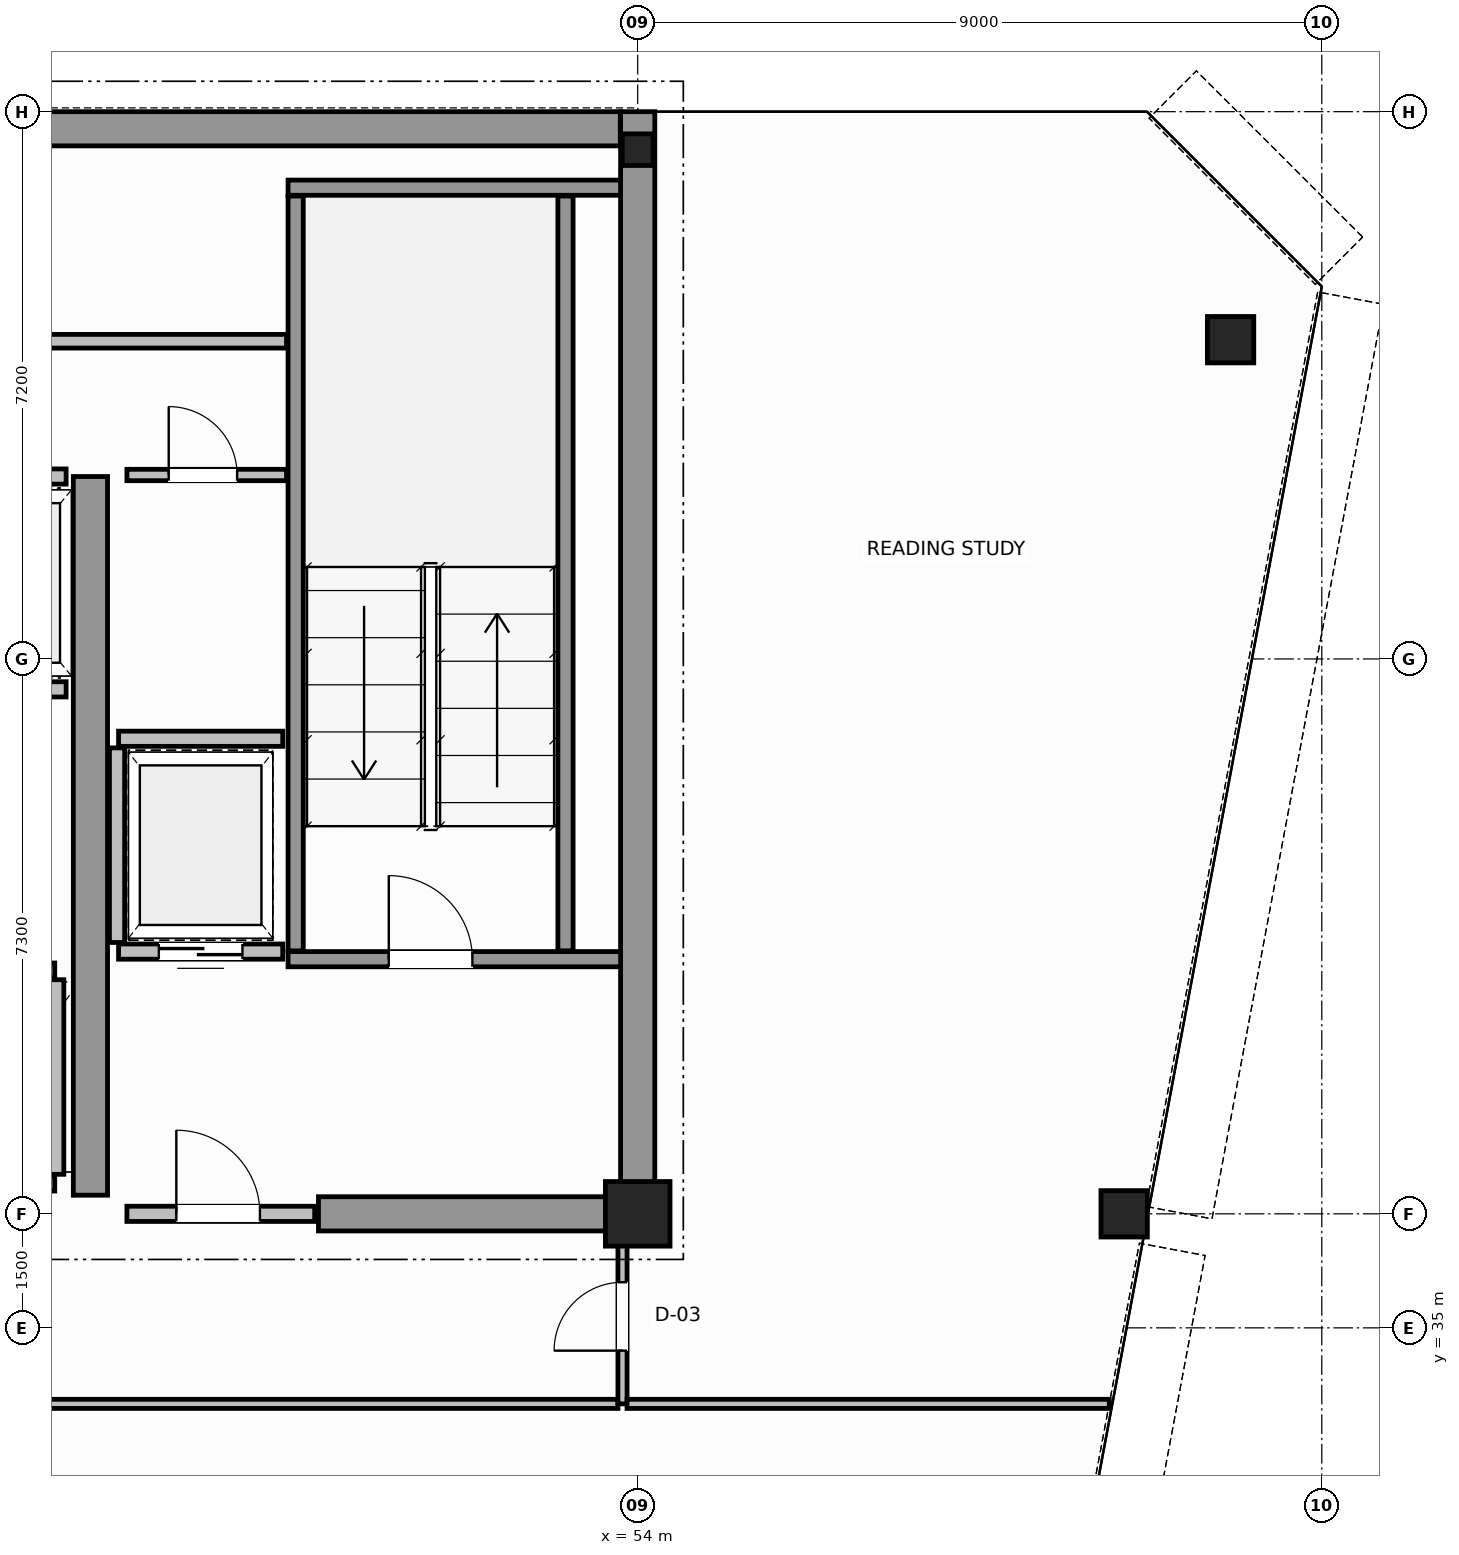
"""IFC4 building model, lengths in metres.
Left out: names, types, materials, properties, quantities, classifications, styles, units other than length and angle.
Written with IfcOpenShell. Run it as: python <this file> out.ifc"""

import sys

from ifc_helpers import new_model, si_unit, direction, frame, frame_2d, origin, origin_2d, place, context, subcontext, project, spatial, rectangle, hollow_circle, i_section, extrude, source, transform, mapped, element, fill, save


model = new_model("IFC4")
c1 = context("Model", 3, precision=1e-05, world=origin(), true_north=direction((0.0, 1.0)))
c2 = subcontext(c1, "Body", "Model", "MODEL_VIEW")
j1 = project(units=[si_unit("LENGTHUNIT", "METRE"), si_unit("PLANEANGLEUNIT", "RADIAN")], contexts=[c1])
p1 = place(None, origin())
s1 = spatial("IfcSite", under=j1, at=p1, CompositionType="ELEMENT")
p2 = place(p1, origin())
s2 = spatial("IfcBuilding", under=s1, at=p2, CompositionType="ELEMENT")
p3 = place(p2, frame((0.0, 0.0, 287.8)))
s3 = spatial("IfcBuildingStorey", under=s2, at=p3, CompositionType="ELEMENT", Elevation=287.8)
m1 = source(origin(), c2, "Body", "SweptSolid", [
    extrude(rectangle(XDim=0.85, YDim=0.85, at=origin_2d()), origin(), (0.0, 0.0, 1.0), 3.8),
])
p4 = place(p3, frame((54.0, 36.5, 0.0), z_axis=(0.0, 0.0, 1.0), x_axis=(1.0, 0.0, 0.0)))
e1 = element("IfcColumn", 1, at=p4, inside=s3, PredefinedType="COLUMN", context=c2, shape_type="MappedRepresentation", body=[
    mapped(m1, transform((0.0, 0.0, 0.0), scale=1.0)),
])
m2 = source(origin(), c2, "Body", "SweptSolid", [
    extrude(i_section(OverallWidth=0.406, OverallDepth=0.416, WebThickness=0.03, FlangeThickness=0.042, FilletRadius=0.015, at=origin_2d()), origin(), (0.0, 0.0, 1.0), 3.8),
])
p5 = place(p3, frame((54.0, 50.5, 0.0), z_axis=(0.0, 0.0, 1.0), x_axis=(1.0, 0.0, 0.0)))
e2 = element("IfcColumn", 2, at=p5, inside=s3, PredefinedType="COLUMN", context=c2, shape_type="MappedRepresentation", body=[
    mapped(m2, transform((0.0, 0.0, 0.0), scale=1.0)),
])
m3 = source(origin(), c2, "Body", "SweptSolid", [
    extrude(hollow_circle(Radius=0.305, WallThickness=0.03, at=origin_2d()), origin(), (0.0, 0.0, 1.0), 3.8),
])
for number, where, z_axis, x_axis in (
    (3, (61.8, 48.0, 0.0), (0.0, 0.0, 1.0), (1.0, 0.0, 0.0)),
    (4, (60.4, 36.5, 0.0), (0.0, 0.0, 1.0), (1.0, 0.0, 0.0)),
):
    element("IfcColumn", number, at=place(p3, frame(where, z_axis=z_axis, x_axis=x_axis)), inside=s3, PredefinedType="COLUMN", context=c2, shape_type="MappedRepresentation", body=[
        mapped(m3, transform((0.0, 0.0, 0.0), scale=1.0)),
    ])
p6 = place(p3, frame((34.002, 50.775, 0.0), z_axis=(0.0, 0.0, 1.0), x_axis=(1.0, 0.0, 0.0)))
e5 = element("IfcWall", 5, at=p6, inside=s3, PredefinedType="SHEAR", context=c2, shape_type="SweptSolid", body=[
    extrude(rectangle(XDim=19.769, YDim=0.45, at=frame_2d((9.885, 0.0))), origin(), (0.0, 0.0, 1.0), 3.8),
])
p7 = place(p3, frame((54.0, 36.5, 0.0), z_axis=(0.0, 0.0, 1.0), x_axis=(0.0, 1.0, 0.0)))
e6 = element("IfcWall", 6, at=p7, inside=s3, PredefinedType="SHEAR", context=c2, shape_type="SweptSolid", body=[
    extrude(rectangle(XDim=14.5, YDim=0.45, at=frame_2d((7.25, 0.0))), origin(), (0.0, 0.0, 1.0), 3.8),
])
p8 = place(p3, frame((49.8, 36.5, 0.0), z_axis=(0.0, 0.0, 1.0), x_axis=(1.0, 0.0, 0.0)))
e7 = element("IfcWall", 7, at=p8, inside=s3, PredefinedType="SHEAR", context=c2, shape_type="SweptSolid", body=[
    extrude(rectangle(XDim=3.955, YDim=0.45, at=frame_2d((1.978, 0.0))), origin(), (0.0, 0.0, 1.0), 2.58),
])
p9 = place(p3, frame((46.8, 36.745, 0.0), z_axis=(0.0, 0.0, 1.0), x_axis=(0.0, 1.0, 0.0)))
e8 = element("IfcWall", 8, at=p9, inside=s3, PredefinedType="SHEAR", context=c2, shape_type="SweptSolid", body=[
    extrude(rectangle(XDim=9.455, YDim=0.45, at=frame_2d((4.728, 0.0))), origin(), (0.0, 0.0, 1.0), 3.8),
])
p10 = place(p3, frame((49.4, 39.85, 0.0), z_axis=(0.0, 0.0, 1.0), x_axis=(1.0, 0.0, 0.0)))
e9 = element("IfcWall", 9, at=p10, inside=s3, PredefinedType="SOLIDWALL", context=c2, shape_type="SweptSolid", body=[
    extrude(rectangle(XDim=4.375, YDim=0.2, at=frame_2d((2.188, 0.0))), origin(), (0.0, 0.0, 1.0), 3.8),
])
p11 = place(p10, frame((1.325, 0.0, 0.0)))
e10 = element("IfcOpeningElement", 10, at=p11, cuts=e9, PredefinedType="OPENING", context=c2, shape_type="SweptSolid", body=[
    extrude(rectangle(XDim=1.1, YDim=2.15, at=frame_2d((0.55, 1.075))), frame((0.0, 0.11, 0.0), z_axis=(0.0, -1.0, 0.0), x_axis=(1.0, 0.0, 0.0)), (0.0, 0.0, 1.0), 0.22),
])
p12 = place(p3, frame((49.4, 50.0, 0.0), z_axis=(0.0, 0.0, 1.0), x_axis=(1.0, 0.0, 0.0)))
e11 = element("IfcWall", 11, at=p12, inside=s3, PredefinedType="SOLIDWALL", context=c2, shape_type="SweptSolid", body=[
    extrude(rectangle(XDim=4.375, YDim=0.2, at=frame_2d((2.188, 0.0))), origin(), (0.0, 0.0, 1.0), 3.8),
])
for number, where, z_axis, x_axis in (
    (12, (49.5, 39.96, 0.0), (0.0, 0.0, 1.0), (0.0, 1.0, 0.0)),
    (13, (53.05, 39.96, 0.0), (0.0, 0.0, 1.0), (0.0, 1.0, 0.0)),
):
    element("IfcWall", number, at=place(p3, frame(where, z_axis=z_axis, x_axis=x_axis)), inside=s3, PredefinedType="SOLIDWALL", context=c2, shape_type="SweptSolid", body=[
        extrude(rectangle(XDim=9.93, YDim=0.2, at=frame_2d((4.965, 0.0))), origin(), (0.0, 0.0, 1.0), 3.8),
    ])
p13 = place(p3, frame((47.28, 36.5, 0.0), z_axis=(0.0, 0.0, 1.0), x_axis=(1.0, 0.0, 0.0)))
e14 = element("IfcWall", 14, at=p13, inside=s3, PredefinedType="SOLIDWALL", context=c2, shape_type="SweptSolid", body=[
    extrude(rectangle(XDim=2.47, YDim=0.2, at=frame_2d((1.235, 0.0))), origin(), (0.0, 0.0, 1.0), 2.57),
])
p14 = place(p13, frame((0.65, 0.0, 0.0)))
e15 = element("IfcOpeningElement", 15, at=p14, cuts=e14, PredefinedType="OPENING", context=c2, shape_type="SweptSolid", body=[
    extrude(rectangle(XDim=1.1, YDim=2.15, at=frame_2d((0.55, 1.075))), frame((0.0, 0.11, 0.0), z_axis=(0.0, -1.0, 0.0), x_axis=(1.0, 0.0, 0.0)), (0.0, 0.0, 1.0), 0.22),
])
p15 = place(p3, frame((44.37, 39.7, 0.0), z_axis=(0.0, 0.0, 1.0), x_axis=(1.0, 0.0, 0.0)))
e16 = element("IfcWall", 16, at=p15, inside=s3, PredefinedType="SOLIDWALL", context=c2, shape_type="SweptSolid", body=[
    extrude(rectangle(XDim=1.96, YDim=0.2, at=frame_2d((0.98, 0.0))), origin(), (0.0, 0.0, 1.0), 3.58),
])
p16 = place(p15, frame((0.43, 0.0, 0.0)))
e17 = element("IfcOpeningElement", 17, at=p16, cuts=e16, PredefinedType="OPENING", context=c2, shape_type="SweptSolid", body=[
    extrude(rectangle(XDim=1.1, YDim=2.15, at=frame_2d((0.55, 1.075))), frame((0.0, 0.11, 0.0), z_axis=(0.0, -1.0, 0.0), x_axis=(1.0, 0.0, 0.0)), (0.0, 0.0, 1.0), 0.22),
])
p17 = place(p3, frame((44.37, 36.9, 0.0), z_axis=(0.0, 0.0, 1.0), x_axis=(1.0, 0.0, 0.0)))
e18 = element("IfcWall", 18, at=p17, inside=s3, PredefinedType="SOLIDWALL", context=c2, shape_type="SweptSolid", body=[
    extrude(rectangle(XDim=1.96, YDim=0.2, at=frame_2d((0.98, 0.0))), origin(), (0.0, 0.0, 1.0), 2.57),
])
p18 = place(p3, frame((46.35, 37.02, 0.0), z_axis=(0.0, 0.0, 1.0), x_axis=(0.0, 1.0, 0.0)))
e19 = element("IfcWall", 19, at=p18, inside=s3, PredefinedType="SOLIDWALL", context=c2, shape_type="SweptSolid", body=[
    extrude(rectangle(XDim=2.56, YDim=0.2, at=frame_2d((1.28, 0.0))), origin(), (0.0, 0.0, 1.0), 3.58),
])
p19 = place(p3, frame((44.62, 43.4, 0.0), z_axis=(0.0, 0.0, 1.0), x_axis=(1.0, 0.0, 0.0)))
e20 = element("IfcWall", 20, at=p19, inside=s3, PredefinedType="SOLIDWALL", context=c2, shape_type="SweptSolid", body=[
    extrude(rectangle(XDim=1.86, YDim=0.2, at=frame_2d((0.93, 0.0))), origin(), (0.0, 0.0, 1.0), 3.58),
])
p20 = place(p19, frame((0.38, 0.0, 0.0)))
e21 = element("IfcOpeningElement", 21, at=p20, cuts=e20, PredefinedType="OPENING", context=c2, shape_type="SweptSolid", body=[
    extrude(rectangle(XDim=1.1, YDim=2.15, at=frame_2d((0.55, 1.075))), frame((0.0, 0.11, 0.0), z_axis=(0.0, -1.0, 0.0), x_axis=(1.0, 0.0, 0.0)), (0.0, 0.0, 1.0), 0.22),
])
p21 = place(p3, frame((44.62, 46.2, 0.0), z_axis=(0.0, 0.0, 1.0), x_axis=(1.0, 0.0, 0.0)))
e22 = element("IfcWall", 22, at=p21, inside=s3, PredefinedType="SOLIDWALL", context=c2, shape_type="SweptSolid", body=[
    extrude(rectangle(XDim=1.86, YDim=0.2, at=frame_2d((0.93, 0.0))), origin(), (0.0, 0.0, 1.0), 3.58),
])
p22 = place(p3, frame((47.17, 39.95, 0.0), z_axis=(0.0, 0.0, 1.0), x_axis=(1.0, 0.0, 0.0)))
e23 = element("IfcWall", 23, at=p22, inside=s3, PredefinedType="SOLIDWALL", context=c2, shape_type="SweptSolid", body=[
    extrude(rectangle(XDim=2.16, YDim=0.2, at=frame_2d((1.08, 0.0))), origin(), (0.0, 0.0, 1.0), 3.58),
])
p23 = place(p22, frame((0.53, 0.0, 0.0)))
e24 = element("IfcOpeningElement", 24, at=p23, cuts=e23, PredefinedType="OPENING", context=c2, shape_type="SweptSolid", body=[
    extrude(rectangle(XDim=1.1, YDim=2.15, at=frame_2d((0.55, 1.075))), frame((0.0, 0.11, 0.0), z_axis=(0.0, -1.0, 0.0), x_axis=(1.0, 0.0, 0.0)), (0.0, 0.0, 1.0), 0.22),
])
p24 = place(p3, frame((47.17, 42.75, 0.0), z_axis=(0.0, 0.0, 1.0), x_axis=(1.0, 0.0, 0.0)))
e25 = element("IfcWall", 25, at=p24, inside=s3, PredefinedType="SOLIDWALL", context=c2, shape_type="SweptSolid", body=[
    extrude(rectangle(XDim=2.16, YDim=0.2, at=frame_2d((1.08, 0.0))), origin(), (0.0, 0.0, 1.0), 3.58),
])
p25 = place(p3, frame((47.15, 40.07, 0.0), z_axis=(0.0, 0.0, 1.0), x_axis=(0.0, 1.0, 0.0)))
e26 = element("IfcWall", 26, at=p25, inside=s3, PredefinedType="SOLIDWALL", context=c2, shape_type="SweptSolid", body=[
    extrude(rectangle(XDim=2.56, YDim=0.2, at=frame_2d((1.28, 0.0))), origin(), (0.0, 0.0, 1.0), 3.58),
])
p26 = place(p3, frame((47.28, 46.22, 0.0), z_axis=(0.0, 0.0, 1.0), x_axis=(1.0, 0.0, 0.0)))
e27 = element("IfcWall", 27, at=p26, inside=s3, PredefinedType="PARTITIONING", context=c2, shape_type="SweptSolid", body=[
    extrude(rectangle(XDim=2.1, YDim=0.15, at=frame_2d((1.05, 0.0))), origin(), (0.0, 0.0, 1.0), 3.58),
])
p27 = place(p26, frame((0.55, 0.0, 0.0)))
e28 = element("IfcOpeningElement", 28, at=p27, cuts=e27, PredefinedType="OPENING", context=c2, shape_type="SweptSolid", body=[
    extrude(rectangle(XDim=0.9, YDim=2.1, at=frame_2d((0.45, 1.05))), frame((0.0, 0.085, 0.0), z_axis=(0.0, -1.0, 0.0), x_axis=(1.0, 0.0, 0.0)), (0.0, 0.0, 1.0), 0.17),
])
p28 = place(p3, frame((40.62, 47.98, 0.0), z_axis=(0.0, 0.0, 1.0), x_axis=(1.0, 0.0, 0.0)))
e29 = element("IfcWall", 29, at=p28, inside=s3, PredefinedType="PLUMBINGWALL", context=c2, shape_type="SweptSolid", body=[
    extrude(rectangle(XDim=8.76, YDim=0.18, at=frame_2d((4.38, 0.0))), origin(), (0.0, 0.0, 1.0), 3.58),
])
p29 = place(p28, frame((3.8, 0.0, 0.0)))
e30 = element("IfcOpeningElement", 30, at=p29, cuts=e29, PredefinedType="OPENING", context=c2, shape_type="SweptSolid", body=[
    extrude(rectangle(XDim=0.9, YDim=2.15, at=frame_2d((0.45, 1.075))), frame((0.0, 0.1, 0.0), z_axis=(0.0, -1.0, 0.0), x_axis=(1.0, 0.0, 0.0)), (0.0, 0.0, 1.0), 0.2),
])
p30 = place(p3, frame((43.26, 34.0, 0.0), z_axis=(0.0, 0.0, 1.0), x_axis=(1.0, 0.0, 0.0)))
e31 = element("IfcWall", 31, at=p30, inside=s3, PredefinedType="PARTITIONING", context=c2, shape_type="SweptSolid", body=[
    extrude(rectangle(XDim=10.48, YDim=0.12, at=frame_2d((5.24, 0.0))), origin(), (0.0, 0.0, 1.0), 3.58),
])
p31 = place(p3, frame((53.8, 34.0, 0.0), z_axis=(0.0, 0.0, 1.0), x_axis=(0.0, 1.0, 0.0)))
e32 = element("IfcWall", 32, at=p31, inside=s3, PredefinedType="PARTITIONING", context=c2, shape_type="SweptSolid", body=[
    extrude(rectangle(XDim=2.44, YDim=0.12, at=frame_2d((1.22, 0.0))), origin(), (0.0, 0.0, 1.0), 3.58),
])
p32 = place(p31, frame((0.7, 0.0, 0.0)))
e33 = element("IfcOpeningElement", 33, at=p32, cuts=e32, PredefinedType="OPENING", context=c2, shape_type="SweptSolid", body=[
    extrude(rectangle(XDim=0.9, YDim=2.15, at=frame_2d((0.45, 1.075))), frame((0.0, 0.07, 0.0), z_axis=(0.0, -1.0, 0.0), x_axis=(1.0, 0.0, 0.0)), (0.0, 0.0, 1.0), 0.14),
])
p33 = place(p3, frame((53.86, 34.0, 0.0), z_axis=(0.0, 0.0, 1.0), x_axis=(1.0, 0.0, 0.0)))
e34 = element("IfcWall", 34, at=p33, inside=s3, PredefinedType="PARTITIONING", context=c2, shape_type="SweptSolid", body=[
    extrude(rectangle(XDim=6.344, YDim=0.12, at=frame_2d((3.172, 0.0))), origin(), (0.0, 0.0, 1.0), 3.58),
])
m4 = source(origin(), c2, "Body", "SweptSolid", [
    extrude(rectangle(XDim=1.1, YDim=2.15, at=frame_2d((0.55, 1.075))), frame((0.0, 0.025, 0.0), z_axis=(0.0, -1.0, 0.0), x_axis=(1.0, 0.0, 0.0)), (0.0, 0.0, 1.0), 0.05),
])
p34 = place(p11, origin())
e35 = element("IfcDoor", 35, at=p34, inside=s3, OperationType="SINGLE_SWING_RIGHT", PredefinedType="DOOR", context=c2, shape_type="MappedRepresentation", body=[
    mapped(m4, transform((0.0, 0.0, 0.0), scale=1.0)),
])
fill(e10, e35)
p35 = place(p14, origin())
e36 = element("IfcDoor", 36, at=p35, inside=s3, OperationType="SINGLE_SWING_LEFT", PredefinedType="DOOR", context=c2, shape_type="MappedRepresentation", body=[
    mapped(m4, transform((0.0, 0.0, 0.0), scale=1.0)),
])
fill(e15, e36)
p36 = place(p23, origin())
e37 = element("IfcDoor", 37, at=p36, inside=s3, OperationType="DOUBLE_DOOR_SLIDING", PredefinedType="DOOR", context=c2, shape_type="MappedRepresentation", body=[
    mapped(m4, transform((0.0, 0.0, 0.0), scale=1.0)),
])
fill(e24, e37)
m5 = source(origin(), c2, "Body", "SweptSolid", [
    extrude(rectangle(XDim=0.9, YDim=2.1, at=frame_2d((0.45, 1.05))), frame((0.0, 0.025, 0.0), z_axis=(0.0, -1.0, 0.0), x_axis=(1.0, 0.0, 0.0)), (0.0, 0.0, 1.0), 0.05),
])
p37 = place(p27, origin())
e38 = element("IfcDoor", 38, at=p37, inside=s3, OperationType="SINGLE_SWING_RIGHT", PredefinedType="DOOR", context=c2, shape_type="MappedRepresentation", body=[
    mapped(m5, transform((0.0, 0.0, 0.0), scale=1.0)),
])
fill(e28, e38)
m6 = source(origin(), c2, "Body", "SweptSolid", [
    extrude(rectangle(XDim=0.9, YDim=2.15, at=frame_2d((0.45, 1.075))), frame((0.0, 0.025, 0.0), z_axis=(0.0, -1.0, 0.0), x_axis=(1.0, 0.0, 0.0)), (0.0, 0.0, 1.0), 0.05),
])
p38 = place(p32, origin())
e39 = element("IfcDoor", 39, at=p38, inside=s3, OperationType="SINGLE_SWING_RIGHT", PredefinedType="DOOR", context=c2, shape_type="MappedRepresentation", body=[
    mapped(m6, transform((0.0, 0.0, 0.0), scale=1.0)),
])
fill(e33, e39)
save(model, sys.argv[1])
